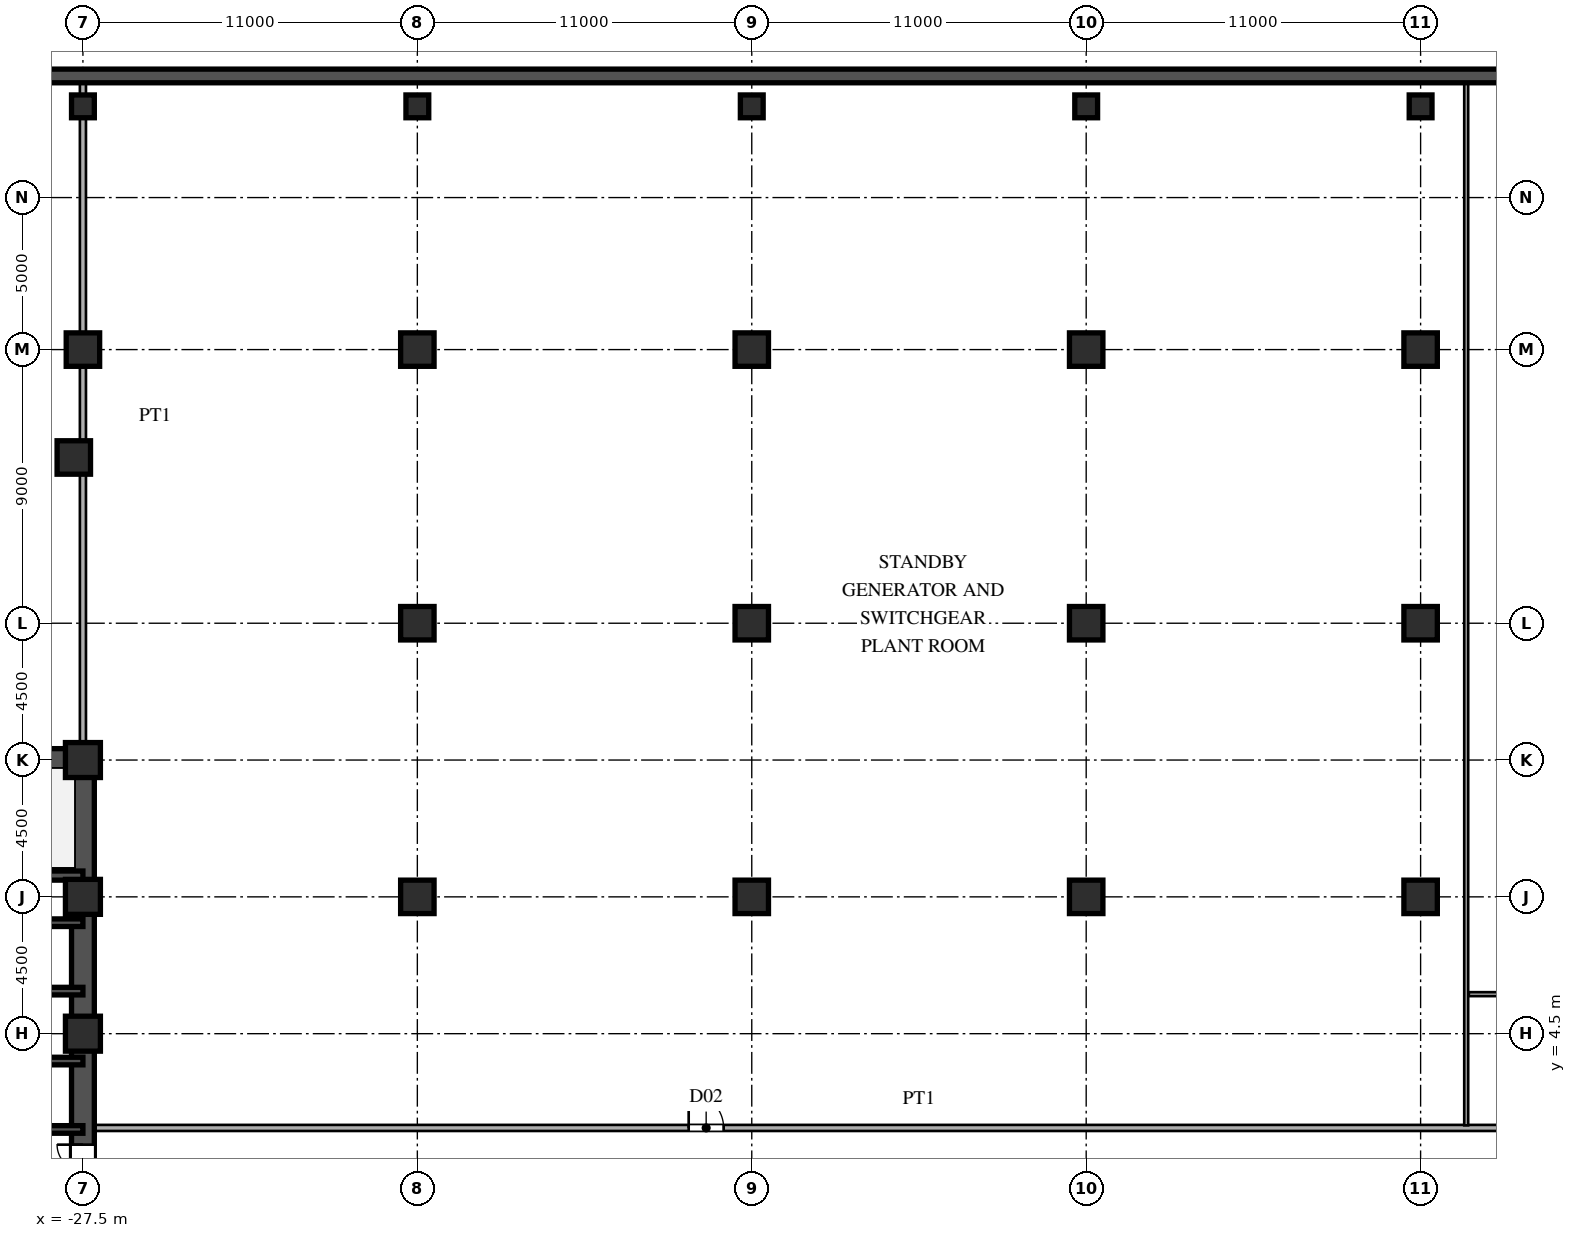
"""IFC4 building model, lengths in metres.
Left out: names, types, materials, properties, quantities, classifications, styles, units other than length and angle.
Written with IfcOpenShell. Run it as: python <this file> out.ifc"""

import sys

from ifc_helpers import new_model, si_unit, direction, frame, frame_2d, origin, origin_2d, place, context, subcontext, project, spatial, rectangle, hollow_rectangle, extrude, source, transform, mapped, element, fill, save


model = new_model("IFC4")
c1 = context("Model", 3, precision=1e-05, world=origin(), true_north=direction((0.0, 1.0)))
c2 = subcontext(c1, "Body", "Model", "MODEL_VIEW")
j1 = project(units=[si_unit("LENGTHUNIT", "METRE"), si_unit("PLANEANGLEUNIT", "RADIAN")], contexts=[c1])
p1 = place(None, origin())
s1 = spatial("IfcSite", under=j1, at=p1, CompositionType="ELEMENT")
p2 = place(p1, origin())
s2 = spatial("IfcBuilding", under=s1, at=p2, CompositionType="ELEMENT")
p3 = place(p2, frame((0.0, 0.0, -9.6)))
s3 = spatial("IfcBuildingStorey", under=s2, at=p3, CompositionType="ELEMENT", Elevation=-9.6)
m1 = source(origin(), c2, "Body", "SweptSolid", [
    extrude(hollow_rectangle(XDim=1.15, YDim=1.15, WallThickness=0.048, at=origin_2d()), origin(), (0.0, 0.0, 1.0), 4.8),
])
for number, where, z_axis, x_axis in (
    (1, (-27.5, 4.5, 0.0), (0.0, 0.0, 1.0), (1.0, 0.0, 0.0)),
    (2, (-27.5, 9.0, 0.0), (0.0, 0.0, 1.0), (1.0, 0.0, 0.0)),
    (3, (-27.5, 13.5, 0.0), (0.0, 0.0, 1.0), (1.0, 0.0, 0.0)),
):
    element("IfcColumn", number, at=place(p3, frame(where, z_axis=z_axis, x_axis=x_axis)), inside=s3, PredefinedType="COLUMN", context=c2, shape_type="MappedRepresentation", body=[
        mapped(m1, transform((0.0, 0.0, 0.0), scale=1.0)),
    ])
m2 = source(origin(), c2, "Body", "SweptSolid", [
    extrude(rectangle(XDim=1.1, YDim=1.1, at=origin_2d()), origin(), (0.0, 0.0, 1.0), 4.8),
])
for number, where, z_axis, x_axis in (
    (4, (-27.5, 27.0, 0.0), (0.0, 0.0, 1.0), (1.0, 0.0, 0.0)),
    (5, (-27.8, 23.451, 0.0), (0.0, 0.0, 1.0), (1.0, 0.0, 0.0)),
    (6, (-16.5, 9.0, 0.0), (0.0, 0.0, 1.0), (1.0, 0.0, 0.0)),
    (7, (-16.5, 18.0, 0.0), (0.0, 0.0, 1.0), (1.0, 0.0, 0.0)),
    (8, (-16.5, 27.0, 0.0), (0.0, 0.0, 1.0), (1.0, 0.0, 0.0)),
    (9, (-5.5, 9.0, 0.0), (0.0, 0.0, 1.0), (1.0, 0.0, 0.0)),
    (10, (-5.5, 18.0, 0.0), (0.0, 0.0, 1.0), (1.0, 0.0, 0.0)),
    (11, (-5.5, 27.0, 0.0), (0.0, 0.0, 1.0), (1.0, 0.0, 0.0)),
    (12, (5.5, 9.0, 0.0), (0.0, 0.0, 1.0), (1.0, 0.0, 0.0)),
    (13, (5.5, 18.0, 0.0), (0.0, 0.0, 1.0), (1.0, 0.0, 0.0)),
    (14, (5.5, 27.0, 0.0), (0.0, 0.0, 1.0), (1.0, 0.0, 0.0)),
    (15, (16.5, 9.0, 0.0), (0.0, 0.0, 1.0), (1.0, 0.0, 0.0)),
    (16, (16.5, 18.0, 0.0), (0.0, 0.0, 1.0), (1.0, 0.0, 0.0)),
    (17, (16.5, 27.0, 0.0), (0.0, 0.0, 1.0), (1.0, 0.0, 0.0)),
):
    element("IfcColumn", number, at=place(p3, frame(where, z_axis=z_axis, x_axis=x_axis)), inside=s3, PredefinedType="COLUMN", context=c2, shape_type="MappedRepresentation", body=[
        mapped(m2, transform((0.0, 0.0, 0.0), scale=1.0)),
    ])
m3 = source(origin(), c2, "Body", "SweptSolid", [
    extrude(rectangle(XDim=0.75, YDim=0.75, at=origin_2d()), origin(), (0.0, 0.0, 1.0), 4.8),
])
for number, where, z_axis, x_axis in (
    (18, (-27.5, 35.0, 0.0), (0.0, 0.0, 1.0), (1.0, 0.0, 0.0)),
    (19, (-16.5, 35.0, 0.0), (0.0, 0.0, 1.0), (1.0, 0.0, 0.0)),
    (20, (-5.5, 35.0, 0.0), (0.0, 0.0, 1.0), (1.0, 0.0, 0.0)),
    (21, (5.5, 35.0, 0.0), (0.0, 0.0, 1.0), (1.0, 0.0, 0.0)),
    (22, (16.5, 35.0, 0.0), (0.0, 0.0, 1.0), (1.0, 0.0, 0.0)),
):
    element("IfcColumn", number, at=place(p3, frame(where, z_axis=z_axis, x_axis=x_axis)), inside=s3, PredefinedType="COLUMN", context=c2, shape_type="MappedRepresentation", body=[
        mapped(m3, transform((0.0, 0.0, 0.0), scale=1.0)),
    ])
p4 = place(p3, frame((71.96, 36.0, 0.0), z_axis=(0.0, 0.0, 1.0), x_axis=(-1.0, 0.0, 0.0)))
e23 = element("IfcWall", 23, at=p4, inside=s3, PredefinedType="USERDEFINED", context=c2, shape_type="SweptSolid", body=[
    extrude(rectangle(XDim=143.92, YDim=0.45, at=frame_2d((71.96, 0.0))), origin(), (0.0, 0.0, 1.0), 4.5),
])
p5 = place(p3, frame((-27.5, 1.3, 0.0), z_axis=(0.0, 0.0, 1.0), x_axis=(0.0, 1.0, 0.0)))
e24 = element("IfcWall", 24, at=p5, inside=s3, PredefinedType="SHEAR", context=c2, shape_type="SweptSolid", body=[
    extrude(rectangle(XDim=12.2, YDim=0.75, at=frame_2d((6.1, 0.0))), origin(), (0.0, 0.0, 1.0), 4.5),
])
p6 = place(p3, frame((-27.5, -1.3, 0.0), z_axis=(0.0, 0.0, 1.0), x_axis=(0.0, 1.0, 0.0)))
e25 = element("IfcWall", 25, at=p6, inside=s3, PredefinedType="SHEAR", context=c2, shape_type="SweptSolid", body=[
    extrude(rectangle(XDim=2.6, YDim=0.75, at=frame_2d((1.3, 0.0))), origin(), (0.0, 0.0, 1.0), 4.5),
])
p7 = place(p6, frame((0.45, 0.0, 0.0)))
e26 = element("IfcOpeningElement", 26, at=p7, cuts=e25, PredefinedType="OPENING", context=c2, shape_type="SweptSolid", body=[
    extrude(rectangle(XDim=1.7, YDim=2.35, at=frame_2d((0.85, 1.175))), frame((0.0, 0.385, 0.0), z_axis=(0.0, -1.0, 0.0), x_axis=(1.0, 0.0, 0.0)), (0.0, 0.0, 1.0), 0.77),
])
p8 = place(p3, frame((-36.5, 13.5, 0.0), z_axis=(0.0, 0.0, 1.0), x_axis=(1.0, 0.0, 0.0)))
e27 = element("IfcWall", 27, at=p8, inside=s3, PredefinedType="SHEAR", context=c2, shape_type="SweptSolid", body=[
    extrude(rectangle(XDim=9.0, YDim=0.75, at=frame_2d((4.5, 0.0))), origin(), (0.0, 0.0, 1.0), 4.5),
])
p9 = place(p3, frame((-36.5, 9.7, 0.0), z_axis=(0.0, 0.0, 1.0), x_axis=(1.0, 0.0, 0.0)))
e28 = element("IfcWall", 28, at=p9, inside=s3, PredefinedType="SHEAR", context=c2, shape_type="SweptSolid", body=[
    extrude(rectangle(XDim=9.0, YDim=0.3, at=frame_2d((4.5, 0.0))), origin(), (0.0, 0.0, 1.0), 4.5),
])
p10 = place(p9, frame((0.6, 0.0, 0.0)))
e29 = element("IfcOpeningElement", 29, at=p10, cuts=e28, PredefinedType="OPENING", context=c2, shape_type="SweptSolid", body=[
    extrude(rectangle(XDim=1.1, YDim=2.2, at=frame_2d((0.55, 1.1))), frame((0.0, 0.16, 0.0), z_axis=(0.0, -1.0, 0.0), x_axis=(1.0, 0.0, 0.0)), (0.0, 0.0, 1.0), 0.32),
])
for number, where, z_axis, x_axis in (
    (30, (-30.3, 1.35, 0.0), (0.0, 0.0, 1.0), (1.0, 0.0, 0.0)),
    (31, (-30.3, 3.6, 0.0), (0.0, 0.0, 1.0), (1.0, 0.0, 0.0)),
    (32, (-30.3, 5.9, 0.0), (0.0, 0.0, 1.0), (1.0, 0.0, 0.0)),
    (33, (-30.3, 8.15, 0.0), (0.0, 0.0, 1.0), (1.0, 0.0, 0.0)),
):
    element("IfcWall", number, at=place(p3, frame(where, z_axis=z_axis, x_axis=x_axis)), inside=s3, PredefinedType="SHEAR", context=c2, shape_type="SweptSolid", body=[
        extrude(rectangle(XDim=2.8, YDim=0.25, at=frame_2d((1.4, 0.0))), origin(), (0.0, 0.0, 1.0), 4.5),
    ])
p11 = place(p3, frame((-27.12, 1.4, 0.0), z_axis=(0.0, 0.0, 1.0), x_axis=(1.0, 0.0, 0.0)))
e34 = element("IfcWall", 34, at=p11, inside=s3, PredefinedType="PARTITIONING", context=c2, shape_type="SweptSolid", body=[
    extrude(rectangle(XDim=54.24, YDim=0.2, at=frame_2d((27.12, 0.0))), origin(), (0.0, 0.0, 1.0), 4.5),
])
p12 = place(p11, frame((19.545, 0.0, 0.0)))
e35 = element("IfcOpeningElement", 35, at=p12, cuts=e34, PredefinedType="OPENING", context=c2, shape_type="SweptSolid", body=[
    extrude(rectangle(XDim=1.15, YDim=2.2, at=frame_2d((0.575, 1.1))), frame((0.0, 0.11, 0.0), z_axis=(0.0, -1.0, 0.0), x_axis=(1.0, 0.0, 0.0)), (0.0, 0.0, 1.0), 0.22),
])
p13 = place(p11, frame((46.93, 0.0, 0.0)))
e36 = element("IfcOpeningElement", 36, at=p13, cuts=e34, PredefinedType="OPENING", context=c2, shape_type="SweptSolid", body=[
    extrude(rectangle(XDim=0.88, YDim=2.1, at=frame_2d((0.44, 1.05))), frame((0.0, 0.11, 0.0), z_axis=(0.0, -1.0, 0.0), x_axis=(1.0, 0.0, 0.0)), (0.0, 0.0, 1.0), 0.22),
])
p14 = place(p3, frame((18.085, 5.8, 0.0), z_axis=(0.0, 0.0, 1.0), x_axis=(1.0, 0.0, 0.0)))
e37 = element("IfcWall", 37, at=p14, inside=s3, PredefinedType="PARTITIONING", context=c2, shape_type="SweptSolid", body=[
    extrude(rectangle(XDim=9.035, YDim=0.13, at=frame_2d((4.518, 0.0))), origin(), (0.0, 0.0, 1.0), 4.5),
])
p15 = place(p3, frame((-27.5, 13.88, 0.0), z_axis=(0.0, 0.0, 1.0), x_axis=(0.0, 1.0, 0.0)))
e38 = element("IfcWall", 38, at=p15, inside=s3, PredefinedType="PARTITIONING", context=c2, shape_type="SweptSolid", body=[
    extrude(rectangle(XDim=7.933, YDim=0.2, at=frame_2d((3.966, 0.0))), origin(), (0.0, 0.0, 1.0), 3.912),
])
p16 = place(p3, frame((-27.5, 21.812, 0.0), z_axis=(0.0, 0.0, 1.0), x_axis=(0.0, 1.0, 0.0)))
e39 = element("IfcWall", 39, at=p16, inside=s3, PredefinedType="PARTITIONING", context=c2, shape_type="SweptSolid", body=[
    extrude(rectangle(XDim=13.958, YDim=0.2, at=frame_2d((6.979, 0.0))), origin(), (0.0, 0.0, 1.0), 4.5),
])
p17 = place(p3, frame((18.0, 1.485, 0.0), z_axis=(0.0, 0.0, 1.0), x_axis=(0.0, 1.0, 0.0)))
e40 = element("IfcWall", 40, at=p17, inside=s3, PredefinedType="PARTITIONING", context=c2, shape_type="SweptSolid", body=[
    extrude(rectangle(XDim=34.285, YDim=0.13, at=frame_2d((17.143, 0.0))), origin(), (0.0, 0.0, 1.0), 4.5),
])
m4 = source(origin(), c2, "Body", "SweptSolid", [
    extrude(rectangle(XDim=1.7, YDim=2.35, at=frame_2d((0.85, 1.175))), frame((0.0, 0.025, 0.0), z_axis=(0.0, -1.0, 0.0), x_axis=(1.0, 0.0, 0.0)), (0.0, 0.0, 1.0), 0.05),
])
p18 = place(p7, origin())
e41 = element("IfcDoor", 41, at=p18, inside=s3, OperationType="DOUBLE_SWING_LEFT", PredefinedType="DOOR", context=c2, shape_type="MappedRepresentation", body=[
    mapped(m4, transform((0.0, 0.0, 0.0), scale=1.0)),
])
fill(e26, e41)
m5 = source(origin(), c2, "Body", "SweptSolid", [
    extrude(rectangle(XDim=1.15, YDim=2.2, at=frame_2d((0.575, 1.1))), frame((0.0, 0.025, 0.0), z_axis=(0.0, -1.0, 0.0), x_axis=(1.0, 0.0, 0.0)), (0.0, 0.0, 1.0), 0.05),
])
p19 = place(p12, origin())
e42 = element("IfcDoor", 42, at=p19, inside=s3, OperationType="SINGLE_SWING_LEFT", PredefinedType="DOOR", context=c2, shape_type="MappedRepresentation", body=[
    mapped(m5, transform((0.0, 0.0, 0.0), scale=1.0)),
])
fill(e35, e42)
save(model, sys.argv[1])
